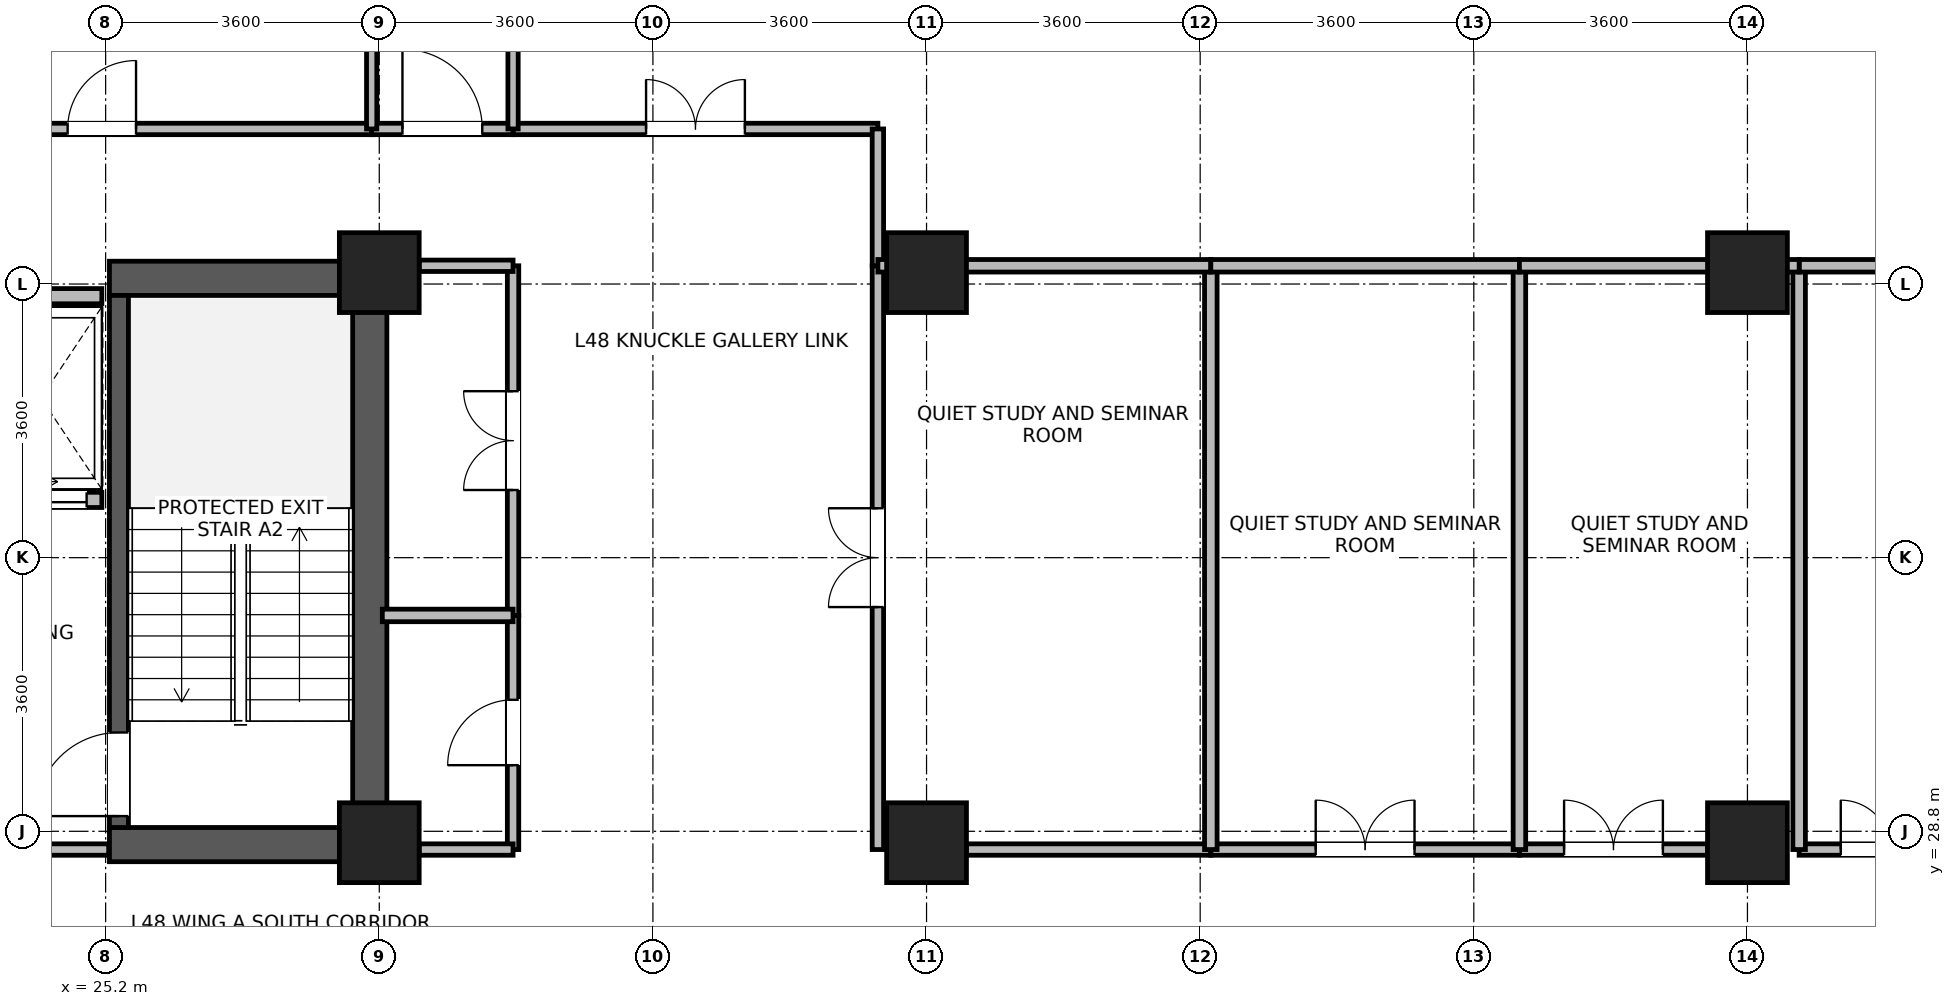
"""IFC4 building model, lengths in metres.
Left out: names, types, materials, properties, quantities, classifications, styles, units other than length and angle.
Written with IfcOpenShell. Run it as: python <this file> out.ifc"""

import sys

from ifc_helpers import new_model, si_unit, direction, frame, frame_2d, origin, origin_2d, place, context, subcontext, project, spatial, rectangle, extrude, source, transform, mapped, element, fill, save


model = new_model("IFC4")
c1 = context("Model", 3, precision=1e-05, world=origin(), true_north=direction((0.0, 1.0)))
c2 = subcontext(c1, "Body", "Model", "MODEL_VIEW")
j1 = project(units=[si_unit("LENGTHUNIT", "METRE"), si_unit("PLANEANGLEUNIT", "RADIAN")], contexts=[c1])
p1 = place(None, origin())
s1 = spatial("IfcSite", under=j1, at=p1, CompositionType="ELEMENT")
p2 = place(p1, origin())
s2 = spatial("IfcBuilding", under=s1, at=p2, CompositionType="ELEMENT")
p3 = place(p2, frame((0.0, 0.0, 188.3)))
s3 = spatial("IfcBuildingStorey", under=s2, at=p3, CompositionType="ELEMENT", Elevation=188.3)
p4 = place(p3, frame((28.675, 28.4, 0.0), z_axis=(0.0, 0.0, 1.0), x_axis=(0.0, 1.0, 0.0)))
e1 = element("IfcWall", 1, at=p4, inside=s3, PredefinedType="SHEAR", context=c2, shape_type="SweptSolid", body=[
    extrude(rectangle(XDim=7.9, YDim=0.45, at=frame_2d((3.95, 0.0))), origin(), (0.0, 0.0, 1.0), 3.34),
])
for number, where, z_axis, x_axis in (
    (2, (25.25, 28.625, 0.0), (0.0, 0.0, 1.0), (1.0, 0.0, 0.0)),
    (3, (25.25, 36.075, 0.0), (0.0, 0.0, 1.0), (1.0, 0.0, 0.0)),
):
    element("IfcWall", number, at=place(p3, frame(where, z_axis=z_axis, x_axis=x_axis)), inside=s3, PredefinedType="SHEAR", context=c2, shape_type="SweptSolid", body=[
        extrude(rectangle(XDim=3.2, YDim=0.45, at=frame_2d((1.6, 0.0))), origin(), (0.0, 0.0, 1.0), 3.34),
    ])
p5 = place(p3, frame((25.375, 28.85, 0.0), z_axis=(0.0, 0.0, 1.0), x_axis=(0.0, 1.0, 0.0)))
e4 = element("IfcWall", 4, at=p5, inside=s3, PredefinedType="SHEAR", context=c2, shape_type="SweptSolid", body=[
    extrude(rectangle(XDim=7.0, YDim=0.25, at=frame_2d((3.5, 0.0))), origin(), (0.0, 0.0, 1.0), 3.34),
])
p6 = place(p5, frame((0.15, 0.0, 0.0)))
e5 = element("IfcOpeningElement", 5, at=p6, cuts=e4, PredefinedType="OPENING", context=c2, shape_type="SweptSolid", body=[
    extrude(rectangle(XDim=1.1, YDim=2.08, at=frame_2d((0.55, 1.04))), frame((0.0, 0.135, 0.0), z_axis=(0.0, -1.0, 0.0), x_axis=(1.0, 0.0, 0.0)), (0.0, 0.0, 1.0), 0.27),
])
m1 = source(origin(), c2, "Body", "SweptSolid", [
    extrude(rectangle(XDim=1.05, YDim=1.05, at=origin_2d()), origin(), (0.0, 0.0, 1.0), 3.7),
])
for number, where, z_axis, x_axis in (
    (6, (28.8, 28.65, 0.0), (0.0, 0.0, 1.0), (1.0, 0.0, 0.0)),
    (7, (28.8, 36.15, 0.0), (0.0, 0.0, 1.0), (1.0, 0.0, 0.0)),
    (8, (36.0, 28.65, 0.0), (0.0, 0.0, 1.0), (1.0, 0.0, 0.0)),
    (9, (36.0, 36.15, 0.0), (0.0, 0.0, 1.0), (1.0, 0.0, 0.0)),
    (10, (46.8, 28.65, 0.0), (0.0, 0.0, 1.0), (1.0, 0.0, 0.0)),
    (11, (46.8, 36.15, 0.0), (0.0, 0.0, 1.0), (1.0, 0.0, 0.0)),
):
    element("IfcColumn", number, at=place(p3, frame(where, z_axis=z_axis, x_axis=x_axis)), inside=s3, PredefinedType="COLUMN", context=c2, shape_type="MappedRepresentation", body=[
        mapped(m1, transform((0.0, 0.0, 0.0), x_axis=(1.0, 0.0, 0.0), y_axis=(0.0, 1.0, 0.0), z_axis=(0.0, 0.0, 1.0), scale=1.0)),
    ])
p7 = place(p3, frame((23.55, 33.16, 0.0), z_axis=(0.0, 0.0, 1.0), x_axis=(1.0, 0.0, 0.0)))
e12 = element("IfcWall", 12, at=p7, inside=s3, PredefinedType="PARTITIONING", context=c2, shape_type="SweptSolid", body=[
    extrude(rectangle(XDim=1.6, YDim=0.2, at=frame_2d((0.8, 0.0))), origin(), (0.0, 0.0, 1.0), 3.32),
])
p8 = place(p7, frame((0.2, 0.0, 0.0)))
e13 = element("IfcOpeningElement", 13, at=p8, cuts=e12, PredefinedType="OPENING", context=c2, shape_type="SweptSolid", body=[
    extrude(rectangle(XDim=1.2, YDim=2.12, at=frame_2d((0.6, 1.06))), frame((0.0, 0.11, 0.0), z_axis=(0.0, -1.0, 0.0), x_axis=(1.0, 0.0, 0.0)), (0.0, 0.0, 1.0), 0.22),
])
p9 = place(p3, frame((23.55, 35.84, 0.0), z_axis=(0.0, 0.0, 1.0), x_axis=(1.0, 0.0, 0.0)))
e14 = element("IfcWall", 14, at=p9, inside=s3, PredefinedType="PARTITIONING", context=c2, shape_type="SweptSolid", body=[
    extrude(rectangle(XDim=1.6, YDim=0.2, at=frame_2d((0.8, 0.0))), origin(), (0.0, 0.0, 1.0), 2.32),
])
p10 = place(p3, frame((35.36, 28.56, 0.0), z_axis=(0.0, 0.0, 1.0), x_axis=(0.0, 1.0, 0.0)))
e15 = element("IfcWall", 15, at=p10, inside=s3, PredefinedType="PARTITIONING", context=c2, shape_type="SweptSolid", body=[
    extrude(rectangle(XDim=7.68, YDim=0.15, at=frame_2d((3.84, 0.0))), origin(), (0.0, 0.0, 1.0), 3.32),
])
p11 = place(p10, frame((3.19, 0.0, 0.0)))
e16 = element("IfcOpeningElement", 16, at=p11, cuts=e15, PredefinedType="OPENING", context=c2, shape_type="SweptSolid", body=[
    extrude(rectangle(XDim=1.3, YDim=2.12, at=frame_2d((0.65, 1.06))), frame((0.0, 0.085, 0.0), z_axis=(0.0, -1.0, 0.0), x_axis=(1.0, 0.0, 0.0)), (0.0, 0.0, 1.0), 0.17),
])
p12 = place(p3, frame((21.6, 38.04, 0.0), z_axis=(0.0, 0.0, 1.0), x_axis=(1.0, 0.0, 0.0)))
e17 = element("IfcWall", 17, at=p12, inside=s3, PredefinedType="PARTITIONING", context=c2, shape_type="SweptSolid", body=[
    extrude(rectangle(XDim=7.1, YDim=0.15, at=frame_2d((3.55, 0.0))), origin(), (0.0, 0.0, 1.0), 3.32),
])
p13 = place(p12, frame((3.1, 0.0, 0.0)))
e18 = element("IfcOpeningElement", 18, at=p13, cuts=e17, PredefinedType="OPENING", context=c2, shape_type="SweptSolid", body=[
    extrude(rectangle(XDim=0.9, YDim=2.08, at=frame_2d((0.45, 1.04))), frame((0.0, 0.085, 0.0), z_axis=(0.0, -1.0, 0.0), x_axis=(1.0, 0.0, 0.0)), (0.0, 0.0, 1.0), 0.17),
])
p14 = place(p3, frame((47.48, 28.56, 0.0), z_axis=(0.0, 0.0, 1.0), x_axis=(1.0, 0.0, 0.0)))
e19 = element("IfcWall", 19, at=p14, inside=s3, PredefinedType="PARTITIONING", context=c2, shape_type="SweptSolid", body=[
    extrude(rectangle(XDim=2.395, YDim=0.15, at=frame_2d((1.198, 0.0))), origin(), (0.0, 0.0, 1.0), 2.72),
])
p15 = place(p14, frame((0.548, 0.0, 0.0)))
e20 = element("IfcOpeningElement", 20, at=p15, cuts=e19, PredefinedType="OPENING", context=c2, shape_type="SweptSolid", body=[
    extrude(rectangle(XDim=1.3, YDim=2.12, at=frame_2d((0.65, 1.06))), frame((0.0, 0.085, 0.0), z_axis=(0.0, -1.0, 0.0), x_axis=(1.0, 0.0, 0.0)), (0.0, 0.0, 1.0), 0.17),
])
p16 = place(p3, frame((30.56, 38.04, 0.0), z_axis=(0.0, 0.0, 1.0), x_axis=(1.0, 0.0, 0.0)))
e21 = element("IfcWall", 21, at=p16, inside=s3, PredefinedType="PARTITIONING", context=c2, shape_type="SweptSolid", body=[
    extrude(rectangle(XDim=4.8, YDim=0.15, at=frame_2d((2.4, 0.0))), origin(), (0.0, 0.0, 1.0), 3.32),
])
p17 = place(p16, frame((1.75, 0.0, 0.0)))
e22 = element("IfcOpeningElement", 22, at=p17, cuts=e21, PredefinedType="OPENING", context=c2, shape_type="SweptSolid", body=[
    extrude(rectangle(XDim=1.3, YDim=2.12, at=frame_2d((0.65, 1.06))), frame((0.0, 0.085, 0.0), z_axis=(0.0, -1.0, 0.0), x_axis=(1.0, 0.0, 0.0)), (0.0, 0.0, 1.0), 0.17),
])
p18 = place(p3, frame((30.56, 31.64, 0.0), z_axis=(0.0, 0.0, 1.0), x_axis=(0.0, 1.0, 0.0)))
e23 = element("IfcWall", 23, at=p18, inside=s3, PredefinedType="PARTITIONING", context=c2, shape_type="SweptSolid", body=[
    extrude(rectangle(XDim=4.6, YDim=0.15, at=frame_2d((2.3, 0.0))), origin(), (0.0, 0.0, 1.0), 3.32),
])
p19 = place(p18, frame((1.65, 0.0, 0.0)))
e24 = element("IfcOpeningElement", 24, at=p19, cuts=e23, PredefinedType="OPENING", context=c2, shape_type="SweptSolid", body=[
    extrude(rectangle(XDim=1.3, YDim=2.12, at=frame_2d((0.65, 1.06))), frame((0.0, 0.085, 0.0), z_axis=(0.0, -1.0, 0.0), x_axis=(1.0, 0.0, 0.0)), (0.0, 0.0, 1.0), 0.17),
])
p20 = place(p3, frame((36.525, 28.56, 0.0), z_axis=(0.0, 0.0, 1.0), x_axis=(1.0, 0.0, 0.0)))
e25 = element("IfcWall", 25, at=p20, inside=s3, PredefinedType="PARTITIONING", context=c2, shape_type="SweptSolid", body=[
    extrude(rectangle(XDim=3.215, YDim=0.15, at=frame_2d((1.607, 0.0))), origin(), (0.0, 0.0, 1.0), 2.72),
])
p21 = place(p3, frame((39.74, 28.56, 0.0), z_axis=(0.0, 0.0, 1.0), x_axis=(1.0, 0.0, 0.0)))
e26 = element("IfcWall", 26, at=p21, inside=s3, PredefinedType="PARTITIONING", context=c2, shape_type="SweptSolid", body=[
    extrude(rectangle(XDim=4.06, YDim=0.15, at=frame_2d((2.03, 0.0))), origin(), (0.0, 0.0, 1.0), 2.72),
])
p22 = place(p21, frame((1.38, 0.0, 0.0)))
e27 = element("IfcOpeningElement", 27, at=p22, cuts=e26, PredefinedType="OPENING", context=c2, shape_type="SweptSolid", body=[
    extrude(rectangle(XDim=1.3, YDim=2.12, at=frame_2d((0.65, 1.06))), frame((0.0, 0.085, 0.0), z_axis=(0.0, -1.0, 0.0), x_axis=(1.0, 0.0, 0.0)), (0.0, 0.0, 1.0), 0.17),
])
p23 = place(p3, frame((43.8, 28.56, 0.0), z_axis=(0.0, 0.0, 1.0), x_axis=(1.0, 0.0, 0.0)))
e28 = element("IfcWall", 28, at=p23, inside=s3, PredefinedType="PARTITIONING", context=c2, shape_type="SweptSolid", body=[
    extrude(rectangle(XDim=2.475, YDim=0.15, at=frame_2d((1.237, 0.0))), origin(), (0.0, 0.0, 1.0), 2.72),
])
p24 = place(p23, frame((0.587, 0.0, 0.0)))
e29 = element("IfcOpeningElement", 29, at=p24, cuts=e28, PredefinedType="OPENING", context=c2, shape_type="SweptSolid", body=[
    extrude(rectangle(XDim=1.3, YDim=2.12, at=frame_2d((0.65, 1.06))), frame((0.0, 0.085, 0.0), z_axis=(0.0, -1.0, 0.0), x_axis=(1.0, 0.0, 0.0)), (0.0, 0.0, 1.0), 0.17),
])
p25 = place(p3, frame((30.56, 28.56, 0.0), z_axis=(0.0, 0.0, 1.0), x_axis=(0.0, 1.0, 0.0)))
e30 = element("IfcWall", 30, at=p25, inside=s3, PredefinedType="PARTITIONING", context=c2, shape_type="SweptSolid", body=[
    extrude(rectangle(XDim=3.08, YDim=0.15, at=frame_2d((1.54, 0.0))), origin(), (0.0, 0.0, 1.0), 3.32),
])
p26 = place(p25, frame((1.11, 0.0, 0.0)))
e31 = element("IfcOpeningElement", 31, at=p26, cuts=e30, PredefinedType="OPENING", context=c2, shape_type="SweptSolid", body=[
    extrude(rectangle(XDim=0.86, YDim=2.02, at=frame_2d((0.43, 1.01))), frame((0.0, 0.085, 0.0), z_axis=(0.0, -1.0, 0.0), x_axis=(1.0, 0.0, 0.0)), (0.0, 0.0, 1.0), 0.17),
])
p27 = place(p3, frame((28.7, 38.04, 0.0), z_axis=(0.0, 0.0, 1.0), x_axis=(1.0, 0.0, 0.0)))
e32 = element("IfcWall", 32, at=p27, inside=s3, PredefinedType="PARTITIONING", context=c2, shape_type="SweptSolid", body=[
    extrude(rectangle(XDim=1.86, YDim=0.15, at=frame_2d((0.93, 0.0))), origin(), (0.0, 0.0, 1.0), 3.32),
])
p28 = place(p27, frame((0.405, 0.0, 0.0)))
e33 = element("IfcOpeningElement", 33, at=p28, cuts=e32, PredefinedType="OPENING", context=c2, shape_type="SweptSolid", body=[
    extrude(rectangle(XDim=1.05, YDim=2.12, at=frame_2d((0.525, 1.06))), frame((0.0, 0.085, 0.0), z_axis=(0.0, -1.0, 0.0), x_axis=(1.0, 0.0, 0.0)), (0.0, 0.0, 1.0), 0.17),
])
p29 = place(p3, frame((35.36, 36.24, 0.0), z_axis=(0.0, 0.0, 1.0), x_axis=(0.0, 1.0, 0.0)))
e34 = element("IfcWall", 34, at=p29, inside=s3, PredefinedType="PARTITIONING", context=c2, shape_type="SweptSolid", body=[
    extrude(rectangle(XDim=1.8, YDim=0.15, at=frame_2d((0.9, 0.0))), origin(), (0.0, 0.0, 1.0), 3.32),
])
for number, where, z_axis, x_axis in (
    (35, (29.325, 28.56, 0.0), (0.0, 0.0, 1.0), (1.0, 0.0, 0.0)),
    (36, (29.325, 36.24, 0.0), (0.0, 0.0, 1.0), (1.0, 0.0, 0.0)),
):
    element("IfcWall", number, at=place(p3, frame(where, z_axis=z_axis, x_axis=x_axis)), inside=s3, PredefinedType="PARTITIONING", context=c2, shape_type="SweptSolid", body=[
        extrude(rectangle(XDim=1.235, YDim=0.15, at=frame_2d((0.618, 0.0))), origin(), (0.0, 0.0, 1.0), 2.72),
    ])
for number, where, z_axis, x_axis in (
    (37, (39.74, 28.56, 0.0), (0.0, 0.0, 1.0), (0.0, 1.0, 0.0)),
    (38, (43.8, 28.56, 0.0), (0.0, 0.0, 1.0), (0.0, 1.0, 0.0)),
    (39, (47.48, 28.56, 0.0), (0.0, 0.0, 1.0), (0.0, 1.0, 0.0)),
):
    element("IfcWall", number, at=place(p3, frame(where, z_axis=z_axis, x_axis=x_axis)), inside=s3, PredefinedType="PARTITIONING", context=c2, shape_type="SweptSolid", body=[
        extrude(rectangle(XDim=7.68, YDim=0.165, at=frame_2d((3.84, 0.0))), origin(), (0.0, 0.0, 1.0), 3.32),
    ])
p30 = place(p3, frame((47.48, 36.24, 0.0), z_axis=(0.0, 0.0, 1.0), x_axis=(1.0, 0.0, 0.0)))
e40 = element("IfcWall", 40, at=p30, inside=s3, PredefinedType="PARTITIONING", context=c2, shape_type="SweptSolid", body=[
    extrude(rectangle(XDim=6.888, YDim=0.165, at=frame_2d((3.444, 0.0))), origin(), (0.0, 0.0, 1.0), 2.72),
])
p31 = place(p3, frame((28.7, 38.04, 0.0), z_axis=(0.0, 0.0, 1.0), x_axis=(0.0, 1.0, 0.0)))
e41 = element("IfcWall", 41, at=p31, inside=s3, PredefinedType="PARTITIONING", context=c2, shape_type="SweptSolid", body=[
    extrude(rectangle(XDim=5.028, YDim=0.135, at=frame_2d((2.514, 0.0))), origin(), (0.0, 0.0, 1.0), 2.87),
])
p32 = place(p3, frame((30.56, 38.04, 0.0), z_axis=(0.0, 0.0, 1.0), x_axis=(0.0, 1.0, 0.0)))
e42 = element("IfcWall", 42, at=p32, inside=s3, PredefinedType="PARTITIONING", context=c2, shape_type="SweptSolid", body=[
    extrude(rectangle(XDim=5.028, YDim=0.135, at=frame_2d((2.514, 0.0))), origin(), (0.0, 0.0, 1.0), 3.32),
])
p33 = place(p3, frame((35.36, 36.24, 0.0), z_axis=(0.0, 0.0, 1.0), x_axis=(1.0, 0.0, 0.0)))
e43 = element("IfcWall", 43, at=p33, inside=s3, PredefinedType="PARTITIONING", context=c2, shape_type="SweptSolid", body=[
    extrude(rectangle(XDim=4.38, YDim=0.165, at=frame_2d((2.19, 0.0))), origin(), (0.0, 0.0, 1.0), 2.72),
])
p34 = place(p3, frame((39.74, 36.24, 0.0), z_axis=(0.0, 0.0, 1.0), x_axis=(1.0, 0.0, 0.0)))
e44 = element("IfcWall", 44, at=p34, inside=s3, PredefinedType="PARTITIONING", context=c2, shape_type="SweptSolid", body=[
    extrude(rectangle(XDim=4.06, YDim=0.165, at=frame_2d((2.03, 0.0))), origin(), (0.0, 0.0, 1.0), 2.72),
])
p35 = place(p3, frame((43.8, 36.24, 0.0), z_axis=(0.0, 0.0, 1.0), x_axis=(1.0, 0.0, 0.0)))
e45 = element("IfcWall", 45, at=p35, inside=s3, PredefinedType="PARTITIONING", context=c2, shape_type="SweptSolid", body=[
    extrude(rectangle(XDim=3.68, YDim=0.165, at=frame_2d((1.84, 0.0))), origin(), (0.0, 0.0, 1.0), 2.72),
])
p36 = place(p3, frame((21.76, 28.56, 0.0), z_axis=(0.0, 0.0, 1.0), x_axis=(1.0, 0.0, 0.0)))
e46 = element("IfcWall", 46, at=p36, inside=s3, PredefinedType="PARTITIONING", context=c2, shape_type="SweptSolid", body=[
    extrude(rectangle(XDim=3.48, YDim=0.15, at=frame_2d((1.74, 0.0))), origin(), (0.0, 0.0, 1.0), 2.32),
])
p37 = place(p36, frame((0.99, 0.0, 0.0)))
e47 = element("IfcOpeningElement", 47, at=p37, cuts=e46, PredefinedType="OPENING", context=c2, shape_type="SweptSolid", body=[
    extrude(rectangle(XDim=1.5, YDim=2.1, at=frame_2d((0.75, 1.05))), frame((0.0, 0.085, 0.0), z_axis=(0.0, -1.0, 0.0), x_axis=(1.0, 0.0, 0.0)), (0.0, 0.0, 1.0), 0.17),
])
p38 = place(p3, frame((28.84, 31.64, 0.0), z_axis=(0.0, 0.0, 1.0), x_axis=(1.0, 0.0, 0.0)))
e48 = element("IfcWall", 48, at=p38, inside=s3, PredefinedType="PARTITIONING", context=c2, shape_type="SweptSolid", body=[
    extrude(rectangle(XDim=1.72, YDim=0.165, at=frame_2d((0.86, 0.0))), origin(), (0.0, 0.0, 1.0), 3.32),
])
p39 = place(p6, origin())
e49 = element("IfcDoor", 49, at=p39, inside=s3, OperationType="SINGLE_SWING_LEFT", PredefinedType="DOOR", context=c2, shape_type="SweptSolid", body=[
    extrude(rectangle(XDim=1.1, YDim=2.08, at=frame_2d((0.55, 1.04))), frame((0.0, 0.025, 0.0), z_axis=(0.0, -1.0, 0.0), x_axis=(1.0, 0.0, 0.0)), (0.0, 0.0, 1.0), 0.05),
])
fill(e5, e49)
p40 = place(p8, origin())
e50 = element("IfcDoor", 50, at=p40, inside=s3, OperationType="SLIDING_TO_RIGHT", PredefinedType="DOOR", context=c2, shape_type="SweptSolid", body=[
    extrude(rectangle(XDim=1.2, YDim=2.12, at=frame_2d((0.6, 1.06))), frame((0.0, 0.025, 0.0), z_axis=(0.0, -1.0, 0.0), x_axis=(1.0, 0.0, 0.0)), (0.0, 0.0, 1.0), 0.05),
])
fill(e13, e50)
p41 = place(p11, origin())
e51 = element("IfcDoor", 51, at=p41, inside=s3, OperationType="DOUBLE_DOOR_SINGLE_SWING", PredefinedType="DOOR", context=c2, shape_type="SweptSolid", body=[
    extrude(rectangle(XDim=1.3, YDim=2.12, at=frame_2d((0.65, 1.06))), frame((0.0, 0.025, 0.0), z_axis=(0.0, -1.0, 0.0), x_axis=(1.0, 0.0, 0.0)), (0.0, 0.0, 1.0), 0.05),
])
fill(e16, e51)
p42 = place(p13, origin())
e52 = element("IfcDoor", 52, at=p42, inside=s3, OperationType="SINGLE_SWING_RIGHT", PredefinedType="DOOR", context=c2, shape_type="SweptSolid", body=[
    extrude(rectangle(XDim=0.9, YDim=2.08, at=frame_2d((0.45, 1.04))), frame((0.0, 0.025, 0.0), z_axis=(0.0, -1.0, 0.0), x_axis=(1.0, 0.0, 0.0)), (0.0, 0.0, 1.0), 0.05),
])
fill(e18, e52)
p43 = place(p15, origin())
e53 = element("IfcDoor", 53, at=p43, inside=s3, OperationType="DOUBLE_DOOR_SINGLE_SWING", PredefinedType="DOOR", context=c2, shape_type="SweptSolid", body=[
    extrude(rectangle(XDim=1.3, YDim=2.12, at=frame_2d((0.65, 1.06))), frame((0.0, 0.025, 0.0), z_axis=(0.0, -1.0, 0.0), x_axis=(1.0, 0.0, 0.0)), (0.0, 0.0, 1.0), 0.05),
])
fill(e20, e53)
p44 = place(p17, origin())
e54 = element("IfcDoor", 54, at=p44, inside=s3, OperationType="DOUBLE_DOOR_SINGLE_SWING", PredefinedType="DOOR", context=c2, shape_type="SweptSolid", body=[
    extrude(rectangle(XDim=1.3, YDim=2.12, at=frame_2d((0.65, 1.06))), frame((0.0, 0.025, 0.0), z_axis=(0.0, -1.0, 0.0), x_axis=(1.0, 0.0, 0.0)), (0.0, 0.0, 1.0), 0.05),
])
fill(e22, e54)
p45 = place(p19, origin())
e55 = element("IfcDoor", 55, at=p45, inside=s3, OperationType="DOUBLE_DOOR_SINGLE_SWING", PredefinedType="DOOR", context=c2, shape_type="SweptSolid", body=[
    extrude(rectangle(XDim=1.3, YDim=2.12, at=frame_2d((0.65, 1.06))), frame((0.0, 0.025, 0.0), z_axis=(0.0, -1.0, 0.0), x_axis=(1.0, 0.0, 0.0)), (0.0, 0.0, 1.0), 0.05),
])
fill(e24, e55)
p46 = place(p22, origin())
e56 = element("IfcDoor", 56, at=p46, inside=s3, OperationType="DOUBLE_DOOR_SINGLE_SWING", PredefinedType="DOOR", context=c2, shape_type="SweptSolid", body=[
    extrude(rectangle(XDim=1.3, YDim=2.12, at=frame_2d((0.65, 1.06))), frame((0.0, 0.025, 0.0), z_axis=(0.0, -1.0, 0.0), x_axis=(1.0, 0.0, 0.0)), (0.0, 0.0, 1.0), 0.05),
])
fill(e27, e56)
p47 = place(p24, origin())
e57 = element("IfcDoor", 57, at=p47, inside=s3, OperationType="DOUBLE_DOOR_SINGLE_SWING", PredefinedType="DOOR", context=c2, shape_type="SweptSolid", body=[
    extrude(rectangle(XDim=1.3, YDim=2.12, at=frame_2d((0.65, 1.06))), frame((0.0, 0.025, 0.0), z_axis=(0.0, -1.0, 0.0), x_axis=(1.0, 0.0, 0.0)), (0.0, 0.0, 1.0), 0.05),
])
fill(e29, e57)
p48 = place(p26, origin())
e58 = element("IfcDoor", 58, at=p48, inside=s3, OperationType="SINGLE_SWING_LEFT", PredefinedType="DOOR", context=c2, shape_type="SweptSolid", body=[
    extrude(rectangle(XDim=0.86, YDim=2.02, at=frame_2d((0.43, 1.01))), frame((0.0, 0.025, 0.0), z_axis=(0.0, -1.0, 0.0), x_axis=(1.0, 0.0, 0.0)), (0.0, 0.0, 1.0), 0.05),
])
fill(e31, e58)
p49 = place(p28, origin())
e59 = element("IfcDoor", 59, at=p49, inside=s3, OperationType="SINGLE_SWING_LEFT", PredefinedType="DOOR", context=c2, shape_type="SweptSolid", body=[
    extrude(rectangle(XDim=1.05, YDim=2.12, at=frame_2d((0.525, 1.06))), frame((0.0, 0.025, 0.0), z_axis=(0.0, -1.0, 0.0), x_axis=(1.0, 0.0, 0.0)), (0.0, 0.0, 1.0), 0.05),
])
fill(e33, e59)
save(model, sys.argv[1])
